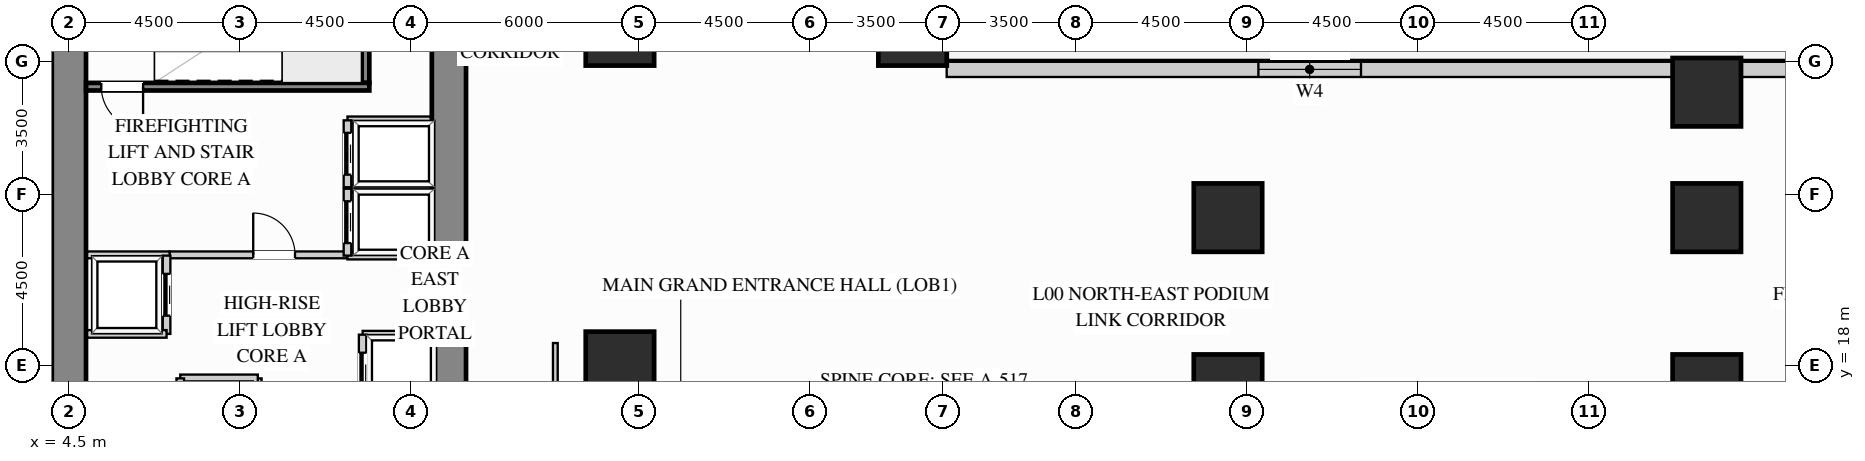
"""IFC4 building model, lengths in metres.
Left out: names, types, materials, properties, quantities, classifications, styles, units other than length and angle.
Written with IfcOpenShell. Run it as: python <this file> out.ifc"""

import sys

from ifc_helpers import new_model, si_unit, direction, frame, frame_2d, origin, origin_2d, place, context, subcontext, project, spatial, rectangle, extrude, source, transform, mapped, element, fill, save


model = new_model("IFC4")
c1 = context("Model", 3, precision=1e-05, world=origin(), true_north=direction((0.0, 1.0)))
c2 = subcontext(c1, "Body", "Model", "MODEL_VIEW")
j1 = project(units=[si_unit("LENGTHUNIT", "METRE"), si_unit("PLANEANGLEUNIT", "RADIAN")], contexts=[c1])
p1 = place(None, origin())
s1 = spatial("IfcSite", under=j1, at=p1, CompositionType="ELEMENT")
p2 = place(p1, origin())
s2 = spatial("IfcBuilding", under=s1, at=p2, CompositionType="ELEMENT")
p3 = place(p2, origin())
s3 = spatial("IfcBuildingStorey", under=s2, at=p3, CompositionType="ELEMENT", Elevation=0.0)
m1 = source(origin(), c2, "Body", "SweptSolid", [
    extrude(rectangle(XDim=1.8, YDim=1.8, at=origin_2d()), origin(), (0.0, 0.0, 1.0), 4.25),
])
for number, where, z_axis, x_axis in (
    (1, (26.7, 26.8, 0.0), (0.0, 0.0, 1.0), (1.0, 0.0, 0.0)),
    (2, (47.6, 17.4, 0.0), (0.0, 0.0, 1.0), (1.0, 0.0, 0.0)),
    (3, (47.6, 21.9, 0.0), (0.0, 0.0, 1.0), (1.0, 0.0, 0.0)),
    (4, (47.6, 25.2, 0.0), (0.0, 0.0, 1.0), (1.0, 0.0, 0.0)),
    (5, (19.0, 18.0, 0.0), (0.0, 0.0, 1.0), (1.0, 0.0, 0.0)),
    (6, (19.0, 26.8, 0.0), (0.0, 0.0, 1.0), (1.0, 0.0, 0.0)),
    (7, (35.0, 17.4, 0.0), (0.0, 0.0, 1.0), (1.0, 0.0, 0.0)),
    (8, (35.0, 21.9, 0.0), (0.0, 0.0, 1.0), (1.0, 0.0, 0.0)),
):
    element("IfcColumn", number, at=place(p3, frame(where, z_axis=z_axis, x_axis=x_axis)), inside=s3, PredefinedType="COLUMN", context=c2, shape_type="MappedRepresentation", body=[
        mapped(m1, transform((0.0, 0.0, 0.0), x_axis=(1.0, 0.0, 0.0), y_axis=(0.0, 1.0, 0.0), z_axis=(0.0, 0.0, 1.0))),
    ])
m2 = source(origin(), c2, "Body", "SweptSolid", [
    extrude(rectangle(XDim=9.87, YDim=0.9, at=frame_2d((4.935, 0.0))), origin(), (0.0, 0.0, 1.0), 4.25),
])
p4 = place(p3, frame((14.5, 8.95, 0.0), z_axis=(0.0, 0.0, 1.0), x_axis=(0.0, 1.0, 0.0)))
e9 = element("IfcWall", 9, at=p4, inside=s3, PredefinedType="SHEAR", context=c2, shape_type="MappedRepresentation", body=[
    mapped(m2, transform((0.0, 0.0, 0.0), x_axis=(1.0, 0.0, 0.0), y_axis=(0.0, 1.0, 0.0), z_axis=(0.0, 0.0, 1.0))),
])
m3 = source(origin(), c2, "Body", "SweptSolid", [
    extrude(rectangle(XDim=8.17, YDim=0.9, at=frame_2d((4.085, 0.0))), origin(), (0.0, 0.0, 1.0), 4.25),
])
p5 = place(p3, frame((14.5, 20.88, 0.0), z_axis=(0.0, 0.0, 1.0), x_axis=(0.0, 1.0, 0.0)))
e10 = element("IfcWall", 10, at=p5, inside=s3, PredefinedType="SHEAR", context=c2, shape_type="MappedRepresentation", body=[
    mapped(m3, transform((0.0, 0.0, 0.0), x_axis=(1.0, 0.0, 0.0), y_axis=(0.0, 1.0, 0.0), z_axis=(0.0, 0.0, 1.0))),
])
m4 = source(origin(), c2, "Body", "SweptSolid", [
    extrude(rectangle(XDim=14.4, YDim=0.9, at=frame_2d((7.2, 0.0))), origin(), (0.0, 0.0, 1.0), 4.25),
])
p6 = place(p3, frame((4.5, 14.65, 0.0), z_axis=(0.0, 0.0, 1.0), x_axis=(0.0, 1.0, 0.0)))
e11 = element("IfcWall", 11, at=p6, inside=s3, PredefinedType="SHEAR", context=c2, shape_type="MappedRepresentation", body=[
    mapped(m4, transform((0.0, 0.0, 0.0), x_axis=(1.0, 0.0, 0.0), y_axis=(0.0, 1.0, 0.0), z_axis=(0.0, 0.0, 1.0))),
])
p7 = place(p3, frame((57.502, 25.8, 0.0), z_axis=(0.0, 0.0, 1.0), x_axis=(-1.0, 0.0, 0.0)))
e12 = element("IfcWall", 12, at=p7, inside=s3, PredefinedType="SOLIDWALL", context=c2, shape_type="SweptSolid", body=[
    extrude(rectangle(XDim=9.004, YDim=0.4, at=frame_2d((4.502, 0.0))), origin(), (0.0, 0.0, 1.0), 4.235),
])
p8 = place(p7, frame((3.152, 0.0, 0.65)))
e13 = element("IfcOpeningElement", 13, at=p8, cuts=e12, PredefinedType="OPENING", context=c2, shape_type="SweptSolid", body=[
    extrude(rectangle(XDim=2.7, YDim=2.6, at=frame_2d((1.35, 1.3))), frame((0.0, 0.21, 0.0), z_axis=(0.0, -1.0, 0.0), x_axis=(1.0, 0.0, 0.0)), (0.0, 0.0, 1.0), 0.42),
])
p9 = place(p3, frame((46.702, 25.8, 0.0), z_axis=(0.0, 0.0, 1.0), x_axis=(-1.0, 0.0, 0.0)))
e14 = element("IfcWall", 14, at=p9, inside=s3, PredefinedType="SOLIDWALL", context=c2, shape_type="SweptSolid", body=[
    extrude(rectangle(XDim=19.104, YDim=0.4, at=frame_2d((9.552, 0.0))), origin(), (0.0, 0.0, 1.0), 4.235),
])
p10 = place(p9, frame((8.202, 0.0, 0.65)))
e15 = element("IfcOpeningElement", 15, at=p10, cuts=e14, PredefinedType="OPENING", context=c2, shape_type="SweptSolid", body=[
    extrude(rectangle(XDim=2.7, YDim=2.6, at=frame_2d((1.35, 1.3))), frame((0.0, 0.21, 0.0), z_axis=(0.0, -1.0, 0.0), x_axis=(1.0, 0.0, 0.0)), (0.0, 0.0, 1.0), 0.42),
])
p11 = place(p3, frame((7.15, 20.92, 0.0), z_axis=(0.0, 0.0, 1.0), x_axis=(1.0, 0.0, 0.0)))
e16 = element("IfcWall", 16, at=p11, inside=s3, PredefinedType="PARTITIONING", context=c2, shape_type="SweptSolid", body=[
    extrude(rectangle(XDim=4.68, YDim=0.18, at=frame_2d((2.34, 0.0))), origin(), (0.0, 0.0, 1.0), 4.235),
])
p12 = place(p11, frame((2.2, 0.0, 0.0)))
e17 = element("IfcOpeningElement", 17, at=p12, cuts=e16, PredefinedType="OPENING", context=c2, shape_type="SweptSolid", body=[
    extrude(rectangle(XDim=1.1, YDim=2.15, at=frame_2d((0.55, 1.075))), frame((0.0, 0.1, 0.0), z_axis=(0.0, -1.0, 0.0), x_axis=(1.0, 0.0, 0.0)), (0.0, 0.0, 1.0), 0.2),
])
m5 = source(origin(), c2, "Body", "SweptSolid", [
    extrude(rectangle(XDim=2.17, YDim=0.18, at=frame_2d((1.085, 0.0))), origin(), (0.0, 0.0, 1.0), 4.235),
])
p13 = place(p3, frame((4.98, 20.92, 0.0), z_axis=(0.0, 0.0, 1.0), x_axis=(1.0, 0.0, 0.0)))
e18 = element("IfcWall", 18, at=p13, inside=s3, PredefinedType="PARTITIONING", context=c2, shape_type="MappedRepresentation", body=[
    mapped(m5, transform((0.0, 0.0, 0.0), x_axis=(1.0, 0.0, 0.0), y_axis=(0.0, 1.0, 0.0), z_axis=(0.0, 0.0, 1.0))),
])
p14 = place(p3, frame((17.3, 12.6, 0.0), z_axis=(0.0, 0.0, 1.0), x_axis=(0.0, 1.0, 0.0)))
e19 = element("IfcWall", 19, at=p14, inside=s3, PredefinedType="PARTITIONING", context=c2, shape_type="SweptSolid", body=[
    extrude(rectangle(XDim=6.0, YDim=0.125, at=frame_2d((3.0, 0.0))), origin(), (0.0, 0.0, 1.0), 4.235),
])
p15 = place(p14, frame((2.525, 0.0, 0.0)))
e20 = element("IfcOpeningElement", 20, at=p15, cuts=e19, PredefinedType="OPENING", context=c2, shape_type="SweptSolid", body=[
    extrude(rectangle(XDim=0.95, YDim=2.15, at=frame_2d((0.475, 1.075))), frame((0.0, 0.073, 0.0), z_axis=(0.0, -1.0, 0.0), x_axis=(1.0, 0.0, 0.0)), (0.0, 0.0, 1.0), 0.145),
])
m6 = source(origin(), c2, "Body", "SweptSolid", [
    extrude(rectangle(XDim=2.19, YDim=0.2, at=frame_2d((1.095, 0.0))), origin(), (0.0, 0.0, 1.0), 4.235),
])
for number, where, z_axis, x_axis in (
    (21, (11.83, 22.66, 0.0), (0.0, 0.0, 1.0), (1.0, 0.0, 0.0)),
    (22, (11.83, 20.9, 0.0), (0.0, 0.0, 1.0), (1.0, 0.0, 0.0)),
):
    element("IfcWall", number, at=place(p3, frame(where, z_axis=z_axis, x_axis=x_axis)), inside=s3, PredefinedType="PARTITIONING", context=c2, shape_type="MappedRepresentation", body=[
        mapped(m6, transform((0.0, 0.0, 0.0), x_axis=(1.0, 0.0, 0.0), y_axis=(0.0, 1.0, 0.0), z_axis=(0.0, 0.0, 1.0))),
    ])
p16 = place(p3, frame((11.83, 20.9, 0.0), z_axis=(0.0, 0.0, 1.0), x_axis=(0.0, 1.0, 0.0)))
e23 = element("IfcWall", 23, at=p16, inside=s3, PredefinedType="PARTITIONING", context=c2, shape_type="SweptSolid", body=[
    extrude(rectangle(XDim=1.76, YDim=0.2, at=frame_2d((0.88, 0.0))), origin(), (0.0, 0.0, 1.0), 4.235),
])
p17 = place(p16, frame((0.33, 0.0, 0.0)))
e24 = element("IfcOpeningElement", 24, at=p17, cuts=e23, PredefinedType="OPENING", context=c2, shape_type="SweptSolid", body=[
    extrude(rectangle(XDim=1.1, YDim=2.2, at=frame_2d((0.55, 1.1))), frame((0.0, 0.11, 0.0), z_axis=(0.0, -1.0, 0.0), x_axis=(1.0, 0.0, 0.0)), (0.0, 0.0, 1.0), 0.22),
])
p18 = place(p3, frame((11.83, 24.46, 0.0), z_axis=(0.0, 0.0, 1.0), x_axis=(1.0, 0.0, 0.0)))
e25 = element("IfcWall", 25, at=p18, inside=s3, PredefinedType="PARTITIONING", context=c2, shape_type="MappedRepresentation", body=[
    mapped(m6, transform((0.0, 0.0, 0.0), x_axis=(1.0, 0.0, 0.0), y_axis=(0.0, 1.0, 0.0), z_axis=(0.0, 0.0, 1.0))),
])
p19 = place(p3, frame((11.83, 22.7, 0.0), z_axis=(0.0, 0.0, 1.0), x_axis=(0.0, 1.0, 0.0)))
e26 = element("IfcWall", 26, at=p19, inside=s3, PredefinedType="PARTITIONING", context=c2, shape_type="SweptSolid", body=[
    extrude(rectangle(XDim=1.76, YDim=0.2, at=frame_2d((0.88, 0.0))), origin(), (0.0, 0.0, 1.0), 4.235),
])
p20 = place(p19, frame((0.33, 0.0, 0.0)))
e27 = element("IfcOpeningElement", 27, at=p20, cuts=e26, PredefinedType="OPENING", context=c2, shape_type="SweptSolid", body=[
    extrude(rectangle(XDim=1.1, YDim=2.2, at=frame_2d((0.55, 1.1))), frame((0.0, 0.11, 0.0), z_axis=(0.0, -1.0, 0.0), x_axis=(1.0, 0.0, 0.0)), (0.0, 0.0, 1.0), 0.22),
])
m7 = source(origin(), c2, "Body", "SweptSolid", [
    extrude(rectangle(XDim=1.79, YDim=0.2, at=frame_2d((0.895, 0.0))), origin(), (0.0, 0.0, 1.0), 4.235),
])
p21 = place(p3, frame((12.23, 18.82, 0.0), z_axis=(0.0, 0.0, 1.0), x_axis=(1.0, 0.0, 0.0)))
e28 = element("IfcWall", 28, at=p21, inside=s3, PredefinedType="PARTITIONING", context=c2, shape_type="MappedRepresentation", body=[
    mapped(m7, transform((0.0, 0.0, 0.0), x_axis=(1.0, 0.0, 0.0), y_axis=(0.0, 1.0, 0.0), z_axis=(0.0, 0.0, 1.0))),
])
p22 = place(p3, frame((12.23, 16.77, 0.0), z_axis=(0.0, 0.0, 1.0), x_axis=(0.0, 1.0, 0.0)))
e29 = element("IfcWall", 29, at=p22, inside=s3, PredefinedType="PARTITIONING", context=c2, shape_type="SweptSolid", body=[
    extrude(rectangle(XDim=2.05, YDim=0.2, at=frame_2d((1.025, 0.0))), origin(), (0.0, 0.0, 1.0), 4.235),
])
p23 = place(p22, frame((0.475, 0.0, 0.0)))
e30 = element("IfcOpeningElement", 30, at=p23, cuts=e29, PredefinedType="OPENING", context=c2, shape_type="SweptSolid", body=[
    extrude(rectangle(XDim=1.1, YDim=2.2, at=frame_2d((0.55, 1.1))), frame((0.0, 0.11, 0.0), z_axis=(0.0, -1.0, 0.0), x_axis=(1.0, 0.0, 0.0)), (0.0, 0.0, 1.0), 0.22),
])
p24 = place(p3, frame((7.07, 18.84, 0.0), z_axis=(0.0, 0.0, 1.0), x_axis=(0.0, 1.0, 0.0)))
e31 = element("IfcWall", 31, at=p24, inside=s3, PredefinedType="PARTITIONING", context=c2, shape_type="SweptSolid", body=[
    extrude(rectangle(XDim=2.06, YDim=0.2, at=frame_2d((1.03, 0.0))), origin(), (0.0, 0.0, 1.0), 4.235),
])
p25 = place(p24, frame((0.48, 0.0, 0.0)))
e32 = element("IfcOpeningElement", 32, at=p25, cuts=e31, PredefinedType="OPENING", context=c2, shape_type="SweptSolid", body=[
    extrude(rectangle(XDim=1.1, YDim=2.2, at=frame_2d((0.55, 1.1))), frame((0.0, 0.11, 0.0), z_axis=(0.0, -1.0, 0.0), x_axis=(1.0, 0.0, 0.0)), (0.0, 0.0, 1.0), 0.22),
])
m8 = source(origin(), c2, "Body", "SweptSolid", [
    extrude(rectangle(XDim=2.09, YDim=0.2, at=frame_2d((1.045, 0.0))), origin(), (0.0, 0.0, 1.0), 4.235),
])
p26 = place(p3, frame((4.98, 18.84, 0.0), z_axis=(0.0, 0.0, 1.0), x_axis=(1.0, 0.0, 0.0)))
e33 = element("IfcWall", 33, at=p26, inside=s3, PredefinedType="PARTITIONING", context=c2, shape_type="MappedRepresentation", body=[
    mapped(m8, transform((0.0, 0.0, 0.0), x_axis=(1.0, 0.0, 0.0), y_axis=(0.0, 1.0, 0.0), z_axis=(0.0, 0.0, 1.0))),
])
p27 = place(p3, frame((9.47, 14.83, 0.0), z_axis=(0.0, 0.0, 1.0), x_axis=(0.0, 1.0, 0.0)))
e34 = element("IfcWall", 34, at=p27, inside=s3, PredefinedType="PARTITIONING", context=c2, shape_type="SweptSolid", body=[
    extrude(rectangle(XDim=2.84, YDim=0.2, at=frame_2d((1.42, 0.0))), origin(), (0.0, 0.0, 1.0), 4.235),
])
p28 = place(p27, frame((0.87, 0.0, 0.0)))
e35 = element("IfcOpeningElement", 35, at=p28, cuts=e34, PredefinedType="OPENING", context=c2, shape_type="SweptSolid", body=[
    extrude(rectangle(XDim=1.1, YDim=2.2, at=frame_2d((0.55, 1.1))), frame((0.0, 0.11, 0.0), z_axis=(0.0, -1.0, 0.0), x_axis=(1.0, 0.0, 0.0)), (0.0, 0.0, 1.0), 0.22),
])
m9 = source(origin(), c2, "Body", "SweptSolid", [
    extrude(rectangle(XDim=2.04, YDim=0.2, at=frame_2d((1.02, 0.0))), origin(), (0.0, 0.0, 1.0), 4.235),
])
p29 = place(p3, frame((7.43, 17.67, 0.0), z_axis=(0.0, 0.0, 1.0), x_axis=(1.0, 0.0, 0.0)))
e36 = element("IfcWall", 36, at=p29, inside=s3, PredefinedType="PARTITIONING", context=c2, shape_type="MappedRepresentation", body=[
    mapped(m9, transform((0.0, 0.0, 0.0), x_axis=(1.0, 0.0, 0.0), y_axis=(0.0, 1.0, 0.0), z_axis=(0.0, 0.0, 1.0))),
])
m10 = source(origin(), c2, "Body", "SweptSolid", [
    extrude(rectangle(XDim=2.84, YDim=0.2, at=frame_2d((1.42, 0.0))), origin(), (0.0, 0.0, 1.0), 4.235),
])
p30 = place(p3, frame((7.43, 14.83, 0.0), z_axis=(0.0, 0.0, 1.0), x_axis=(0.0, 1.0, 0.0)))
e37 = element("IfcWall", 37, at=p30, inside=s3, PredefinedType="PARTITIONING", context=c2, shape_type="MappedRepresentation", body=[
    mapped(m10, transform((0.0, 0.0, 0.0), x_axis=(1.0, 0.0, 0.0), y_axis=(0.0, 1.0, 0.0), z_axis=(0.0, 0.0, 1.0))),
])
m11 = source(origin(), c2, "Body", "SweptSolid", [
    extrude(rectangle(XDim=3.603, YDim=0.2, at=frame_2d((1.802, 0.0))), origin(), (0.0, 0.0, 1.0), 4.25),
])
p31 = place(p3, frame((12.305, 25.445, 0.0), z_axis=(0.0, 0.0, 1.0), x_axis=(0.0, 1.0, 0.0)))
e38 = element("IfcWall", 38, at=p31, inside=s3, PredefinedType="SHEAR", context=c2, shape_type="MappedRepresentation", body=[
    mapped(m11, transform((0.0, 0.0, 0.0), x_axis=(1.0, 0.0, 0.0), y_axis=(0.0, 1.0, 0.0), z_axis=(0.0, 0.0, 1.0))),
])
p32 = place(p3, frame((4.952, 25.345, 0.0), z_axis=(0.0, 0.0, 1.0), x_axis=(1.0, 0.0, 0.0)))
e39 = element("IfcWall", 39, at=p32, inside=s3, PredefinedType="SHEAR", context=c2, shape_type="SweptSolid", body=[
    extrude(rectangle(XDim=7.453, YDim=0.2, at=frame_2d((3.727, 0.0))), origin(), (0.0, 0.0, 1.0), 4.25),
])
p33 = place(p32, frame((0.4, 0.0, 0.0)))
e40 = element("IfcOpeningElement", 40, at=p33, cuts=e39, PredefinedType="OPENING", context=c2, shape_type="SweptSolid", body=[
    extrude(rectangle(XDim=1.1, YDim=2.15, at=frame_2d((0.55, 1.075))), frame((0.0, 0.11, 0.0), z_axis=(0.0, -1.0, 0.0), x_axis=(1.0, 0.0, 0.0)), (0.0, 0.0, 1.0), 0.22),
])
m12 = source(origin(), c2, "Body", "SweptSolid", [
    extrude(rectangle(XDim=1.1, YDim=2.15, at=frame_2d((0.55, 1.075))), frame((0.0, 0.025, 0.0), z_axis=(0.0, -1.0, 0.0), x_axis=(1.0, 0.0, 0.0)), (0.0, 0.0, 1.0), 0.05),
])
p34 = place(p12, origin())
e41 = element("IfcDoor", 41, at=p34, inside=s3, OperationType="SINGLE_SWING_LEFT", PredefinedType="DOOR", context=c2, shape_type="MappedRepresentation", body=[
    mapped(m12, transform((0.0, 0.0, 0.0), x_axis=(1.0, 0.0, 0.0), y_axis=(0.0, 1.0, 0.0), z_axis=(0.0, 0.0, 1.0))),
])
fill(e17, e41)
m13 = source(origin(), c2, "Body", "SweptSolid", [
    extrude(rectangle(XDim=1.1, YDim=2.2, at=frame_2d((0.55, 1.1))), frame((0.0, 0.025, 0.0), z_axis=(0.0, -1.0, 0.0), x_axis=(1.0, 0.0, 0.0)), (0.0, 0.0, 1.0), 0.05),
])
p35 = place(p17, origin())
e42 = element("IfcDoor", 42, at=p35, inside=s3, OperationType="SLIDING_TO_LEFT", PredefinedType="DOOR", context=c2, shape_type="MappedRepresentation", body=[
    mapped(m13, transform((0.0, 0.0, 0.0), x_axis=(1.0, 0.0, 0.0), y_axis=(0.0, 1.0, 0.0), z_axis=(0.0, 0.0, 1.0))),
])
fill(e24, e42)
p36 = place(p20, origin())
e43 = element("IfcDoor", 43, at=p36, inside=s3, OperationType="SLIDING_TO_LEFT", PredefinedType="DOOR", context=c2, shape_type="MappedRepresentation", body=[
    mapped(m13, transform((0.0, 0.0, 0.0), x_axis=(1.0, 0.0, 0.0), y_axis=(0.0, 1.0, 0.0), z_axis=(0.0, 0.0, 1.0))),
])
fill(e27, e43)
p37 = place(p23, origin())
e44 = element("IfcDoor", 44, at=p37, inside=s3, OperationType="SLIDING_TO_LEFT", PredefinedType="DOOR", context=c2, shape_type="MappedRepresentation", body=[
    mapped(m13, transform((0.0, 0.0, 0.0), x_axis=(1.0, 0.0, 0.0), y_axis=(0.0, 1.0, 0.0), z_axis=(0.0, 0.0, 1.0))),
])
fill(e30, e44)
p38 = place(p25, origin())
e45 = element("IfcDoor", 45, at=p38, inside=s3, OperationType="SLIDING_TO_LEFT", PredefinedType="DOOR", context=c2, shape_type="MappedRepresentation", body=[
    mapped(m13, transform((0.0, 0.0, 0.0), x_axis=(1.0, 0.0, 0.0), y_axis=(0.0, 1.0, 0.0), z_axis=(0.0, 0.0, 1.0))),
])
fill(e32, e45)
m14 = source(origin(), c2, "Body", "SweptSolid", [
    extrude(rectangle(XDim=1.1, YDim=2.15, at=frame_2d((0.55, 1.075))), frame((0.0, 0.025, 0.0), z_axis=(0.0, -1.0, 0.0), x_axis=(1.0, 0.0, 0.0)), (0.0, 0.0, 1.0), 0.05),
])
p39 = place(p33, origin())
e46 = element("IfcDoor", 46, at=p39, inside=s3, OperationType="SINGLE_SWING_RIGHT", PredefinedType="DOOR", context=c2, shape_type="MappedRepresentation", body=[
    mapped(m14, transform((0.0, 0.0, 0.0), x_axis=(1.0, 0.0, 0.0), y_axis=(0.0, 1.0, 0.0), z_axis=(0.0, 0.0, 1.0))),
])
fill(e40, e46)
m15 = source(origin(), c2, "Body", "SweptSolid", [
    extrude(rectangle(XDim=2.7, YDim=2.6, at=frame_2d((1.35, 1.3))), frame((0.0, 0.03, 0.0), z_axis=(0.0, -1.0, 0.0), x_axis=(1.0, 0.0, 0.0)), (0.0, 0.0, 1.0), 0.06),
])
p40 = place(p10, origin())
e47 = element("IfcWindow", 47, at=p40, inside=s3, PartitioningType="SINGLE_PANEL", PredefinedType="WINDOW", context=c2, shape_type="MappedRepresentation", body=[
    mapped(m15, transform((0.0, 0.0, 0.0), x_axis=(1.0, 0.0, 0.0), y_axis=(0.0, 1.0, 0.0), z_axis=(0.0, 0.0, 1.0))),
])
fill(e15, e47)
save(model, sys.argv[1])
